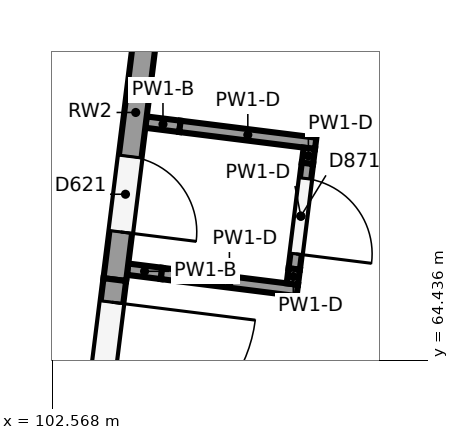
"""IFC4 building model, lengths in metres.
Left out: names, types, materials, properties, quantities, classifications, styles, units other than length and angle.
Written with IfcOpenShell. Run it as: python <this file> out.ifc"""

import sys

from ifc_helpers import new_model, si_unit, direction, frame, frame_2d, origin, place, context, subcontext, project, spatial, rectangle, extrude, element, fill, save


model = new_model("IFC4")
c1 = context("Model", 3, precision=1e-05, world=origin(), true_north=direction((0.0, 1.0)))
c2 = subcontext(c1, "Body", "Model", "MODEL_VIEW")
j1 = project(units=[si_unit("LENGTHUNIT", "METRE"), si_unit("PLANEANGLEUNIT", "RADIAN")], contexts=[c1])
p1 = place(None, origin())
s1 = spatial("IfcSite", under=j1, at=p1, CompositionType="ELEMENT")
p2 = place(p1, origin())
s2 = spatial("IfcBuilding", under=s1, at=p2, CompositionType="ELEMENT")
p3 = place(p2, origin())
s3 = spatial("IfcBuildingStorey", under=s2, at=p3, CompositionType="ELEMENT", Elevation=0.0)
p4 = place(p3, frame((103.39, 65.497, 0.0), z_axis=(0.0, 0.0, 1.0), x_axis=(-0.124123512645, -0.992266775423, 0.0)))
e1 = element("IfcWall", 1, at=p4, inside=s3, PredefinedType="SOLIDWALL", context=c2, shape_type="SweptSolid", body=[
    extrude(rectangle(XDim=4.4, YDim=0.3, at=frame_2d((2.2, 0.0))), origin(), (0.0, 0.0, 1.0), 4.85),
])
p5 = place(p4, frame((0.3, 0.0, 0.0)))
e2 = element("IfcOpeningElement", 2, at=p5, cuts=e1, PredefinedType="OPENING", context=c2, shape_type="SweptSolid", body=[
    extrude(rectangle(XDim=3.8, YDim=2.8, at=frame_2d((1.9, 1.4))), frame((0.0, 0.16, 0.0), z_axis=(0.0, -1.0, 0.0), x_axis=(1.0, 0.0, 0.0)), (0.0, 0.0, 1.0), 0.32),
])
p6 = place(p3, frame((103.94, 69.895, 0.0), z_axis=(0.0, 0.0, 1.0), x_axis=(-0.124116096768, -0.992267703054, 0.0)))
e3 = element("IfcWall", 3, at=p6, inside=s3, PredefinedType="SOLIDWALL", context=c2, shape_type="SweptSolid", body=[
    extrude(rectangle(XDim=4.432, YDim=0.3, at=frame_2d((2.216, 0.0))), origin(), (0.0, 0.0, 1.0), 4.85),
])
p7 = place(p6, frame((2.8, 0.0, 0.0)))
e4 = element("IfcOpeningElement", 4, at=p7, cuts=e3, PredefinedType="OPENING", context=c2, shape_type="SweptSolid", body=[
    extrude(rectangle(XDim=1.0, YDim=2.1, at=frame_2d((0.5, 1.05))), frame((0.0, 0.16, 0.0), z_axis=(0.0, -1.0, 0.0), x_axis=(1.0, 0.0, 0.0)), (0.0, 0.0, 1.0), 0.32),
])
p8 = place(p3, frame((103.801, 67.569, 0.0), z_axis=(0.0, 0.0, 1.0), x_axis=(0.992252817521, -0.124235043856, 0.0)))
e5 = element("IfcWall", 5, at=p8, inside=s3, PredefinedType="PARTITIONING", context=c2, shape_type="SweptSolid", body=[
    extrude(rectangle(XDim=0.45, YDim=0.15, at=frame_2d((0.225, 0.0))), origin(), (0.0, 0.0, 1.0), 4.85),
])
p9 = place(p3, frame((104.247, 67.513, 0.0), z_axis=(0.0, 0.0, 1.0), x_axis=(0.992269528002, -0.124101506031, 0.0)))
e6 = element("IfcWall", 6, at=p9, inside=s3, PredefinedType="PARTITIONING", context=c2, shape_type="SweptSolid", body=[
    extrude(rectangle(XDim=1.8, YDim=0.15, at=frame_2d((0.9, 0.0))), origin(), (0.0, 0.0, 1.0), 6.1),
])
p10 = place(p3, frame((103.558, 65.634, 0.0), z_axis=(0.0, 0.0, 1.0), x_axis=(0.992252817521, -0.124235043856, 0.0)))
e7 = element("IfcWall", 7, at=p10, inside=s3, PredefinedType="PARTITIONING", context=c2, shape_type="SweptSolid", body=[
    extrude(rectangle(XDim=0.45, YDim=0.15, at=frame_2d((0.225, 0.0))), origin(), (0.0, 0.0, 1.0), 4.85),
])
p11 = place(p3, frame((104.005, 65.578, 0.0), z_axis=(0.0, 0.0, 1.0), x_axis=(0.992252817521, -0.124235043856, 0.0)))
e8 = element("IfcWall", 8, at=p11, inside=s3, PredefinedType="PARTITIONING", context=c2, shape_type="SweptSolid", body=[
    extrude(rectangle(XDim=1.8, YDim=0.15, at=frame_2d((0.9, 0.0))), origin(), (0.0, 0.0, 1.0), 6.1),
])
p12 = place(p3, frame((105.949, 67.225, 0.0), z_axis=(0.0, 0.0, 1.0), x_axis=(-0.123283542659, -0.992371486949, 0.0)))
e9 = element("IfcWall", 9, at=p12, inside=s3, PredefinedType="PARTITIONING", context=c2, shape_type="SweptSolid", body=[
    extrude(rectangle(XDim=0.2, YDim=0.15, at=frame_2d((0.1, 0.0))), origin(), (0.0, 0.0, 1.0), 6.1),
])
p13 = place(p3, frame((105.925, 67.026, 0.0), z_axis=(0.0, 0.0, 1.0), x_axis=(-0.124163511603, -0.9922617711, 0.0)))
e10 = element("IfcWall", 10, at=p13, inside=s3, PredefinedType="PARTITIONING", context=c2, shape_type="SweptSolid", body=[
    extrude(rectangle(XDim=1.4, YDim=0.15, at=frame_2d((0.7, 0.0))), origin(), (0.0, 0.0, 1.0), 6.1),
])
p14 = place(p13, frame((0.2, 0.0, 0.0)))
e11 = element("IfcOpeningElement", 11, at=p14, cuts=e10, PredefinedType="OPENING", context=c2, shape_type="SweptSolid", body=[
    extrude(rectangle(XDim=1.0, YDim=2.1, at=frame_2d((0.5, 1.05))), frame((0.0, 0.085, 0.0), z_axis=(0.0, -1.0, 0.0), x_axis=(1.0, 0.0, 0.0)), (0.0, 0.0, 1.0), 0.17),
])
p15 = place(p3, frame((105.751, 65.637, 0.0), z_axis=(0.0, 0.0, 1.0), x_axis=(-0.124485347491, -0.99222144618, 0.0)))
e12 = element("IfcWall", 12, at=p15, inside=s3, PredefinedType="PARTITIONING", context=c2, shape_type="SweptSolid", body=[
    extrude(rectangle(XDim=0.2, YDim=0.15, at=frame_2d((0.1, 0.0))), origin(), (0.0, 0.0, 1.0), 6.1),
])
p16 = place(p5, origin())
e13 = element("IfcDoor", 13, at=p16, inside=s3, OperationType="DOUBLE_DOOR_SINGLE_SWING", PredefinedType="DOOR", context=c2, shape_type="SweptSolid", body=[
    extrude(rectangle(XDim=3.8, YDim=2.8, at=frame_2d((1.9, 1.4))), frame((0.0, 0.025, 0.0), z_axis=(0.0, -1.0, 0.0), x_axis=(1.0, 0.0, 0.0)), (0.0, 0.0, 1.0), 0.05),
])
fill(e2, e13)
p17 = place(p7, origin())
e14 = element("IfcDoor", 14, at=p17, inside=s3, OperationType="SINGLE_SWING_RIGHT", PredefinedType="DOOR", context=c2, shape_type="SweptSolid", body=[
    extrude(rectangle(XDim=1.0, YDim=2.1, at=frame_2d((0.5, 1.05))), frame((0.0, 0.025, 0.0), z_axis=(0.0, -1.0, 0.0), x_axis=(1.0, 0.0, 0.0)), (0.0, 0.0, 1.0), 0.05),
])
fill(e4, e14)
p18 = place(p14, origin())
e15 = element("IfcDoor", 15, at=p18, inside=s3, OperationType="SINGLE_SWING_RIGHT", PredefinedType="DOOR", context=c2, shape_type="SweptSolid", body=[
    extrude(rectangle(XDim=1.0, YDim=2.1, at=frame_2d((0.5, 1.05))), frame((0.0, 0.025, 0.0), z_axis=(0.0, -1.0, 0.0), x_axis=(1.0, 0.0, 0.0)), (0.0, 0.0, 1.0), 0.05),
])
fill(e11, e15)
save(model, sys.argv[1])
